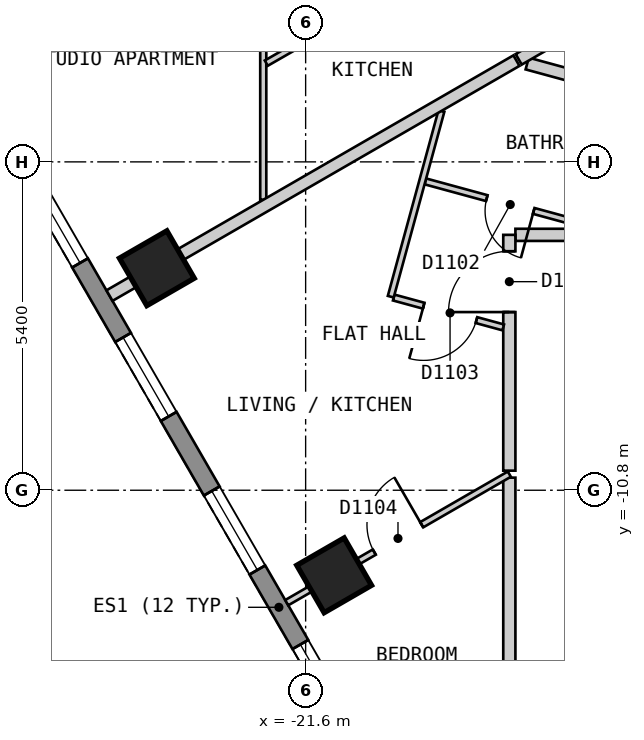
"""IFC4 building model, lengths in metres.
Left out: names, types, materials, properties, quantities, classifications, styles, units other than length and angle.
Written with IfcOpenShell. Run it as: python <this file> out.ifc"""

import sys

from ifc_helpers import new_model, si_unit, direction, frame, frame_2d, origin, origin_2d, place, context, subcontext, project, spatial, polyline, rectangle, outline, extrude, element, fill, save


model = new_model("IFC4")
c1 = context("Model", 3, precision=1e-05, world=origin(), true_north=direction((0.0, 1.0)))
c2 = subcontext(c1, "Body", "Model", "MODEL_VIEW")
j1 = project(units=[si_unit("LENGTHUNIT", "METRE"), si_unit("PLANEANGLEUNIT", "RADIAN")], contexts=[c1])
p1 = place(None, origin())
s1 = spatial("IfcSite", under=j1, at=p1, CompositionType="ELEMENT")
p2 = place(p1, origin())
s2 = spatial("IfcBuilding", under=s1, at=p2, CompositionType="ELEMENT")
p3 = place(p2, frame((0.0, 0.0, 138.6)))
s3 = spatial("IfcBuildingStorey", under=s2, at=p3, CompositionType="ELEMENT", Elevation=138.6)
for number, where, z_axis, x_axis in (
    (1, (-24.047, -7.149, 0.0), (0.0, 0.0, 1.0), (0.5, -0.866, 0.0)),
    (2, (-21.131, -12.199, 0.0), (0.0, 0.0, 1.0), (0.5, -0.866, 0.0)),
):
    element("IfcColumn", number, at=place(p3, frame(where, z_axis=z_axis, x_axis=x_axis)), inside=s3, PredefinedType="COLUMN", context=c2, shape_type="SweptSolid", body=[
        extrude(rectangle(XDim=0.9, YDim=0.9, at=origin_2d()), origin(), (0.0, 0.0, 1.0), 3.0),
    ])
p4 = place(p3, frame((-28.218, -2.025, 0.0), z_axis=(0.0, 0.0, 1.0), x_axis=(0.500017503135, -0.866015298109, 0.0)))
e3 = element("IfcWall", 3, at=p4, inside=s3, PredefinedType="SOLIDWALL", context=c2, shape_type="SweptSolid", body=[
    extrude(outline(polyline([(0.0, -0.15), (24.711, -0.15), (24.631, 0.15), (0.08, 0.15), (0.0, -0.15)])), origin(), (0.0, 0.0, 1.0), 2.7),
])
p5 = place(p4, frame((1.4, 0.0, 0.15)))
e4 = element("IfcOpeningElement", 4, at=p5, cuts=e3, PredefinedType="OPENING", context=c2, shape_type="SweptSolid", body=[
    extrude(rectangle(XDim=1.5, YDim=2.1, at=frame_2d((0.75, 1.05))), frame((0.0, 0.16, 0.0), z_axis=(0.0, -1.0, 0.0), x_axis=(1.0, 0.0, 0.0)), (0.0, 0.0, 1.0), 0.32),
])
p6 = place(p4, frame((4.316, 0.0, 0.15)))
e5 = element("IfcOpeningElement", 5, at=p6, cuts=e3, PredefinedType="OPENING", context=c2, shape_type="SweptSolid", body=[
    extrude(rectangle(XDim=1.5, YDim=2.1, at=frame_2d((0.75, 1.05))), frame((0.0, 0.16, 0.0), z_axis=(0.0, -1.0, 0.0), x_axis=(1.0, 0.0, 0.0)), (0.0, 0.0, 1.0), 0.32),
])
p7 = place(p4, frame((7.231, 0.0, 0.15)))
e6 = element("IfcOpeningElement", 6, at=p7, cuts=e3, PredefinedType="OPENING", context=c2, shape_type="SweptSolid", body=[
    extrude(rectangle(XDim=1.5, YDim=2.1, at=frame_2d((0.75, 1.05))), frame((0.0, 0.16, 0.0), z_axis=(0.0, -1.0, 0.0), x_axis=(1.0, 0.0, 0.0)), (0.0, 0.0, 1.0), 0.32),
])
p8 = place(p4, frame((10.147, 0.0, 0.15)))
e7 = element("IfcOpeningElement", 7, at=p8, cuts=e3, PredefinedType="OPENING", context=c2, shape_type="SweptSolid", body=[
    extrude(rectangle(XDim=1.5, YDim=2.1, at=frame_2d((0.75, 1.05))), frame((0.0, 0.16, 0.0), z_axis=(0.0, -1.0, 0.0), x_axis=(1.0, 0.0, 0.0)), (0.0, 0.0, 1.0), 0.32),
])
p9 = place(p4, frame((13.062, 0.0, 0.15)))
e8 = element("IfcOpeningElement", 8, at=p9, cuts=e3, PredefinedType="OPENING", context=c2, shape_type="SweptSolid", body=[
    extrude(rectangle(XDim=1.5, YDim=2.1, at=frame_2d((0.75, 1.05))), frame((0.0, 0.16, 0.0), z_axis=(0.0, -1.0, 0.0), x_axis=(1.0, 0.0, 0.0)), (0.0, 0.0, 1.0), 0.32),
])
p10 = place(p4, frame((15.977, 0.0, 0.15)))
e9 = element("IfcOpeningElement", 9, at=p10, cuts=e3, PredefinedType="OPENING", context=c2, shape_type="SweptSolid", body=[
    extrude(rectangle(XDim=1.5, YDim=2.1, at=frame_2d((0.75, 1.05))), frame((0.0, 0.16, 0.0), z_axis=(0.0, -1.0, 0.0), x_axis=(1.0, 0.0, 0.0)), (0.0, 0.0, 1.0), 0.32),
])
p11 = place(p4, frame((18.893, 0.0, 0.15)))
e10 = element("IfcOpeningElement", 10, at=p11, cuts=e3, PredefinedType="OPENING", context=c2, shape_type="SweptSolid", body=[
    extrude(rectangle(XDim=1.5, YDim=2.1, at=frame_2d((0.75, 1.05))), frame((0.0, 0.16, 0.0), z_axis=(0.0, -1.0, 0.0), x_axis=(1.0, 0.0, 0.0)), (0.0, 0.0, 1.0), 0.32),
])
p12 = place(p4, frame((21.809, 0.0, 0.15)))
e11 = element("IfcOpeningElement", 11, at=p12, cuts=e3, PredefinedType="OPENING", context=c2, shape_type="SweptSolid", body=[
    extrude(rectangle(XDim=1.5, YDim=2.1, at=frame_2d((0.75, 1.05))), frame((0.0, 0.16, 0.0), z_axis=(0.0, -1.0, 0.0), x_axis=(1.0, 0.0, 0.0)), (0.0, 0.0, 1.0), 0.32),
])
p13 = place(p3, frame((-18.25, -10.593, 0.0), z_axis=(0.0, 0.0, 1.0), x_axis=(0.0, -1.0, 0.0)))
e12 = element("IfcWall", 12, at=p13, inside=s3, PredefinedType="PARTITIONING", context=c2, shape_type="SweptSolid", body=[
    extrude(rectangle(XDim=5.706, YDim=0.2, at=frame_2d((2.853, 0.0))), origin(), (0.0, 0.0, 1.0), 2.7),
])
p14 = place(p3, frame((-18.15, -6.6, 0.0), z_axis=(0.0, 0.0, 1.0), x_axis=(1.0, 0.0, 0.0)))
e13 = element("IfcWall", 13, at=p14, inside=s3, PredefinedType="PARTITIONING", context=c2, shape_type="SweptSolid", body=[
    extrude(rectangle(XDim=2.55, YDim=0.2, at=frame_2d((1.275, 0.0))), origin(), (0.0, 0.0, 1.0), 2.7),
])
p15 = place(p3, frame((-18.25, -10.478, 0.0), z_axis=(0.0, 0.0, 1.0), x_axis=(0.0, 1.0, 0.0)))
e14 = element("IfcWall", 14, at=p15, inside=s3, PredefinedType="PARTITIONING", context=c2, shape_type="SweptSolid", body=[
    extrude(rectangle(XDim=3.878, YDim=0.2, at=frame_2d((1.939, 0.0))), origin(), (0.0, 0.0, 1.0), 2.7),
])
p16 = place(p15, frame((2.608, 0.0, 0.0)))
e15 = element("IfcOpeningElement", 15, at=p16, cuts=e14, PredefinedType="OPENING", context=c2, shape_type="SweptSolid", body=[
    extrude(rectangle(XDim=1.0, YDim=2.1, at=frame_2d((0.5, 1.05))), frame((0.0, 0.11, 0.0), z_axis=(0.0, -1.0, 0.0), x_axis=(1.0, 0.0, 0.0)), (0.0, 0.0, 1.0), 0.22),
])
p17 = place(p3, frame((-19.631, -5.721, 0.0), z_axis=(0.0, 0.0, 1.0), x_axis=(0.964816035809, -0.262925877475, 0.0)))
e16 = element("IfcWall", 16, at=p17, inside=s3, PredefinedType="PARTITIONING", context=c2, shape_type="SweptSolid", body=[
    extrude(rectangle(XDim=3.344, YDim=0.1, at=frame_2d((1.672, 0.0))), origin(), (0.0, 0.0, 1.0), 2.7),
])
p18 = place(p17, frame((1.047, 0.0, 0.0)))
e17 = element("IfcOpeningElement", 17, at=p18, cuts=e16, PredefinedType="OPENING", context=c2, shape_type="SweptSolid", body=[
    extrude(rectangle(XDim=0.8, YDim=2.1, at=frame_2d((0.4, 1.05))), frame((0.0, 0.06, 0.0), z_axis=(0.0, -1.0, 0.0), x_axis=(1.0, 0.0, 0.0)), (0.0, 0.0, 1.0), 0.12),
])
p19 = place(p3, frame((-20.151, -7.631, 0.0), z_axis=(0.0, 0.0, 1.0), x_axis=(0.964784947449, -0.263039930765, 0.0)))
e18 = element("IfcWall", 18, at=p19, inside=s3, PredefinedType="PARTITIONING", context=c2, shape_type="SweptSolid", body=[
    extrude(rectangle(XDim=1.866, YDim=0.1, at=frame_2d((0.933, 0.0))), origin(), (0.0, 0.0, 1.0), 2.7),
])
p20 = place(p19, frame((0.51, 0.0, 0.0)))
e19 = element("IfcOpeningElement", 19, at=p20, cuts=e18, PredefinedType="OPENING", context=c2, shape_type="SweptSolid", body=[
    extrude(rectangle(XDim=0.9, YDim=2.1, at=frame_2d((0.45, 1.05))), frame((0.0, 0.06, 0.0), z_axis=(0.0, -1.0, 0.0), x_axis=(1.0, 0.0, 0.0)), (0.0, 0.0, 1.0), 0.12),
])
p21 = place(p3, frame((-20.2, -7.617, 0.0), z_axis=(0.0, 0.0, 1.0), x_axis=(0.263150035392, 0.964754921663, 0.0)))
e20 = element("IfcWall", 20, at=p21, inside=s3, PredefinedType="PARTITIONING", context=c2, shape_type="SweptSolid", body=[
    extrude(rectangle(XDim=3.166, YDim=0.1, at=frame_2d((1.583, 0.0))), origin(), (0.0, 0.0, 1.0), 2.7),
])
p22 = place(p3, frame((-22.297, -6.023, 0.0), z_axis=(0.0, 0.0, 1.0), x_axis=(0.0, 1.0, 0.0)))
e21 = element("IfcWall", 21, at=p22, inside=s3, PredefinedType="PARTITIONING", context=c2, shape_type="SweptSolid", body=[
    extrude(rectangle(XDim=3.47, YDim=0.1, at=frame_2d((1.735, 0.0))), origin(), (0.0, 0.0, 1.0), 2.7),
])
p23 = place(p3, frame((-21.911, -12.649, 0.0), z_axis=(0.0, 0.0, 1.0), x_axis=(0.865984571374, 0.500070717141, 0.0)))
e22 = element("IfcWall", 22, at=p23, inside=s3, PredefinedType="PARTITIONING", context=c2, shape_type="SweptSolid", body=[
    extrude(rectangle(XDim=4.228, YDim=0.1, at=frame_2d((2.114, 0.0))), origin(), (0.0, 0.0, 1.0), 2.7),
])
p24 = place(p23, frame((1.663, 0.0, 0.0)))
e23 = element("IfcOpeningElement", 23, at=p24, cuts=e22, PredefinedType="OPENING", context=c2, shape_type="SweptSolid", body=[
    extrude(rectangle(XDim=0.9, YDim=2.1, at=frame_2d((0.45, 1.05))), frame((0.0, 0.06, 0.0), z_axis=(0.0, -1.0, 0.0), x_axis=(1.0, 0.0, 0.0)), (0.0, 0.0, 1.0), 0.12),
])
p25 = place(p3, frame((-22.247, -3.776, 0.0), z_axis=(0.0, 0.0, 1.0), x_axis=(0.867243093247, 0.497884943752, 0.0)))
e24 = element("IfcWall", 24, at=p25, inside=s3, PredefinedType="PARTITIONING", context=c2, shape_type="SweptSolid", body=[
    extrude(rectangle(XDim=5.854, YDim=0.1, at=frame_2d((2.927, 0.0))), origin(), (0.0, 0.0, 1.0), 2.7),
])
p26 = place(p25, frame((2.498, 0.0, 0.0)))
e25 = element("IfcOpeningElement", 25, at=p26, cuts=e24, PredefinedType="OPENING", context=c2, shape_type="SweptSolid", body=[
    extrude(rectangle(XDim=0.9, YDim=2.1, at=frame_2d((0.45, 1.05))), frame((0.0, 0.06, 0.0), z_axis=(0.0, -1.0, 0.0), x_axis=(1.0, 0.0, 0.0)), (0.0, 0.0, 1.0), 0.12),
])
p27 = place(p3, frame((-17.956, -3.783, 0.0), z_axis=(0.0, 0.0, 1.0), x_axis=(0.964815336827, -0.2629284424, 0.0)))
e26 = element("IfcWall", 26, at=p27, inside=s3, PredefinedType="PARTITIONING", context=c2, shape_type="SweptSolid", body=[
    extrude(rectangle(XDim=2.514, YDim=0.2, at=frame_2d((1.257, 0.0))), origin(), (0.0, 0.0, 1.0), 2.7),
])
p28 = place(p3, frame((-24.826, -7.599, 0.0), z_axis=(0.0, 0.0, 1.0), x_axis=(0.866031973572, 0.499988620622, 0.0)))
e27 = element("IfcWall", 27, at=p28, inside=s3, PredefinedType="PARTITIONING", context=c2, shape_type="SweptSolid", body=[
    extrude(rectangle(XDim=7.728, YDim=0.2, at=frame_2d((3.864, 0.0))), origin(), (0.0, 0.0, 1.0), 2.7),
])
p29 = place(p3, frame((-18.096, -3.714, 0.0), z_axis=(0.0, 0.0, 1.0), x_axis=(0.865794513859, 0.500399700011, 0.0)))
e28 = element("IfcWall", 28, at=p29, inside=s3, PredefinedType="PARTITIONING", context=c2, shape_type="SweptSolid", body=[
    extrude(rectangle(XDim=2.298, YDim=0.2, at=frame_2d((1.149, 0.0))), origin(), (0.0, 0.0, 1.0), 2.7),
])
p30 = place(p6, origin())
e29 = element("IfcWindow", 29, at=p30, inside=s3, PartitioningType="SINGLE_PANEL", PredefinedType="WINDOW", context=c2, shape_type="SweptSolid", body=[
    extrude(rectangle(XDim=1.5, YDim=2.1, at=frame_2d((0.75, 1.05))), frame((0.0, 0.03, 0.0), z_axis=(0.0, -1.0, 0.0), x_axis=(1.0, 0.0, 0.0)), (0.0, 0.0, 1.0), 0.06),
])
fill(e5, e29)
p31 = place(p7, origin())
e30 = element("IfcWindow", 30, at=p31, inside=s3, PartitioningType="SINGLE_PANEL", PredefinedType="WINDOW", context=c2, shape_type="SweptSolid", body=[
    extrude(rectangle(XDim=1.5, YDim=2.1, at=frame_2d((0.75, 1.05))), frame((0.0, 0.03, 0.0), z_axis=(0.0, -1.0, 0.0), x_axis=(1.0, 0.0, 0.0)), (0.0, 0.0, 1.0), 0.06),
])
fill(e6, e30)
p32 = place(p8, origin())
e31 = element("IfcWindow", 31, at=p32, inside=s3, PartitioningType="SINGLE_PANEL", PredefinedType="WINDOW", context=c2, shape_type="SweptSolid", body=[
    extrude(rectangle(XDim=1.5, YDim=2.1, at=frame_2d((0.75, 1.05))), frame((0.0, 0.03, 0.0), z_axis=(0.0, -1.0, 0.0), x_axis=(1.0, 0.0, 0.0)), (0.0, 0.0, 1.0), 0.06),
])
fill(e7, e31)
p33 = place(p9, origin())
e32 = element("IfcWindow", 32, at=p33, inside=s3, PartitioningType="SINGLE_PANEL", PredefinedType="WINDOW", context=c2, shape_type="SweptSolid", body=[
    extrude(rectangle(XDim=1.5, YDim=2.1, at=frame_2d((0.75, 1.05))), frame((0.0, 0.03, 0.0), z_axis=(0.0, -1.0, 0.0), x_axis=(1.0, 0.0, 0.0)), (0.0, 0.0, 1.0), 0.06),
])
fill(e8, e32)
p34 = place(p16, origin())
e33 = element("IfcDoor", 33, at=p34, inside=s3, OperationType="SINGLE_SWING_LEFT", PredefinedType="DOOR", context=c2, shape_type="SweptSolid", body=[
    extrude(rectangle(XDim=1.0, YDim=2.1, at=frame_2d((0.5, 1.05))), frame((0.0, 0.025, 0.0), z_axis=(0.0, -1.0, 0.0), x_axis=(1.0, 0.0, 0.0)), (0.0, 0.0, 1.0), 0.05),
])
fill(e15, e33)
p35 = place(p18, origin())
e34 = element("IfcDoor", 34, at=p35, inside=s3, OperationType="SINGLE_SWING_RIGHT", PredefinedType="DOOR", context=c2, shape_type="SweptSolid", body=[
    extrude(rectangle(XDim=0.8, YDim=2.1, at=frame_2d((0.4, 1.05))), frame((0.0, 0.025, 0.0), z_axis=(0.0, -1.0, 0.0), x_axis=(1.0, 0.0, 0.0)), (0.0, 0.0, 1.0), 0.05),
])
fill(e17, e34)
p36 = place(p20, origin())
e35 = element("IfcDoor", 35, at=p36, inside=s3, OperationType="SINGLE_SWING_LEFT", PredefinedType="DOOR", context=c2, shape_type="SweptSolid", body=[
    extrude(rectangle(XDim=0.9, YDim=2.1, at=frame_2d((0.45, 1.05))), frame((0.0, 0.025, 0.0), z_axis=(0.0, -1.0, 0.0), x_axis=(1.0, 0.0, 0.0)), (0.0, 0.0, 1.0), 0.05),
])
fill(e19, e35)
p37 = place(p24, origin())
e36 = element("IfcDoor", 36, at=p37, inside=s3, OperationType="SINGLE_SWING_RIGHT", PredefinedType="DOOR", context=c2, shape_type="SweptSolid", body=[
    extrude(rectangle(XDim=0.9, YDim=2.1, at=frame_2d((0.45, 1.05))), frame((0.0, 0.025, 0.0), z_axis=(0.0, -1.0, 0.0), x_axis=(1.0, 0.0, 0.0)), (0.0, 0.0, 1.0), 0.05),
])
fill(e23, e36)
save(model, sys.argv[1])
